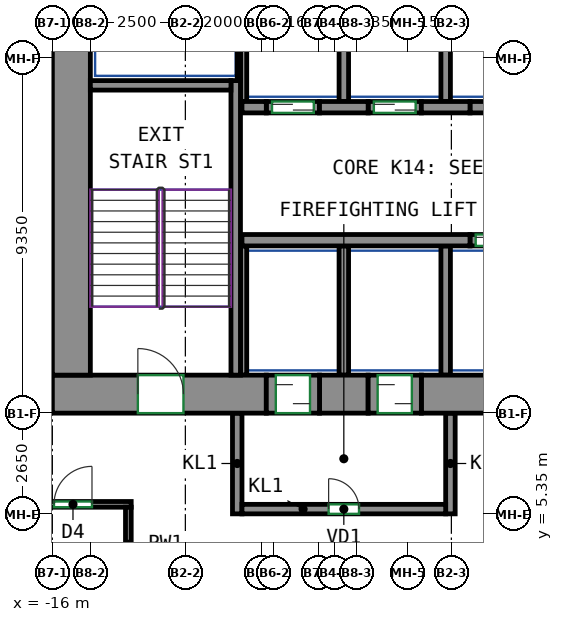
"""IFC4 building model, lengths in metres.
Left out: names, types, materials, properties, quantities, classifications, styles, units other than length and angle.
Written with IfcOpenShell. Run it as: python <this file> out.ifc"""

import sys

from ifc_helpers import new_model, si_unit, direction, frame, frame_2d, origin, place, context, subcontext, project, spatial, rectangle, extrude, source, transform, mapped, element, fill, save


model = new_model("IFC4")
c1 = context("Model", 3, precision=1e-05, world=origin(), true_north=direction((0.0, 1.0)))
c2 = subcontext(c1, "Body", "Model", "MODEL_VIEW")
j1 = project(units=[si_unit("LENGTHUNIT", "METRE"), si_unit("PLANEANGLEUNIT", "RADIAN")], contexts=[c1])
p1 = place(None, origin())
s1 = spatial("IfcSite", under=j1, at=p1, CompositionType="ELEMENT")
p2 = place(p1, origin())
s2 = spatial("IfcBuilding", under=s1, at=p2, CompositionType="ELEMENT")
p3 = place(p2, frame((0.0, 0.0, 59.0)))
s3 = spatial("IfcBuildingStorey", under=s2, at=p3, CompositionType="ELEMENT", Elevation=59.0)
m1 = source(origin(), c2, "Body", "SweptSolid", [
    extrude(rectangle(XDim=5.63, YDim=1.0, at=frame_2d((2.815, 0.0))), origin(), (0.0, 0.0, 1.0), 3.8),
])
p4 = place(p3, frame((-16.0, 8.5, 0.0), z_axis=(0.0, 0.0, 1.0), x_axis=(1.0, 0.0, 0.0)))
e1 = element("IfcWall", 1, at=p4, inside=s3, PredefinedType="SHEAR", context=c2, shape_type="MappedRepresentation", body=[
    mapped(m1, transform((0.0, 0.0, 0.0))),
])
p5 = place(p4, frame((2.25, 0.0, 0.0)))
e2 = element("IfcOpeningElement", 2, at=p5, cuts=e1, PredefinedType="OPENING", context=c2, shape_type="SweptSolid", body=[
    extrude(rectangle(XDim=1.2, YDim=2.1, at=frame_2d((0.6, 1.05))), frame((0.0, 0.51, 0.0), z_axis=(0.0, -1.0, 0.0), x_axis=(1.0, 0.0, 0.0)), (0.0, 0.0, 1.0), 1.02),
])
m2 = source(origin(), c2, "Body", "SweptSolid", [
    extrude(rectangle(XDim=1.28, YDim=1.0, at=frame_2d((0.64, 0.0))), origin(), (0.0, 0.0, 1.0), 3.8),
])
p6 = place(p3, frame((-8.97, 8.5, 0.0), z_axis=(0.0, 0.0, 1.0), x_axis=(1.0, 0.0, 0.0)))
e3 = element("IfcWall", 3, at=p6, inside=s3, PredefinedType="SHEAR", context=c2, shape_type="MappedRepresentation", body=[
    mapped(m2, transform((0.0, 0.0, 0.0))),
])
m3 = source(origin(), c2, "Body", "SweptSolid", [
    extrude(rectangle(XDim=14.18, YDim=1.0, at=frame_2d((7.09, 0.0))), origin(), (0.0, 0.0, 1.0), 3.8),
])
p7 = place(p3, frame((-6.29, 8.5, 0.0), z_axis=(0.0, 0.0, 1.0), x_axis=(1.0, 0.0, 0.0)))
e4 = element("IfcWall", 4, at=p7, inside=s3, PredefinedType="SHEAR", context=c2, shape_type="MappedRepresentation", body=[
    mapped(m3, transform((0.0, 0.0, 0.0))),
])
m4 = source(origin(), c2, "Body", "SweptSolid", [
    extrude(rectangle(XDim=12.0, YDim=1.0, at=frame_2d((6.0, 0.0))), origin(), (0.0, 0.0, 1.0), 3.8),
])
p8 = place(p3, frame((-15.5, 9.0, 0.0), z_axis=(0.0, 0.0, 1.0), x_axis=(0.0, 1.0, 0.0)))
e5 = element("IfcWall", 5, at=p8, inside=s3, PredefinedType="SHEAR", context=c2, shape_type="MappedRepresentation", body=[
    mapped(m4, transform((0.0, 0.0, 0.0))),
])
m5 = source(origin(), c2, "Body", "SweptSolid", [
    extrude(rectangle(XDim=7.75, YDim=0.25, at=frame_2d((3.875, 0.0))), origin(), (0.0, 0.0, 1.0), 3.8),
])
p9 = place(p3, frame((-11.175, 9.0, 0.0), z_axis=(0.0, 0.0, 1.0), x_axis=(0.0, 1.0, 0.0)))
e6 = element("IfcWall", 6, at=p9, inside=s3, PredefinedType="SHEAR", context=c2, shape_type="MappedRepresentation", body=[
    mapped(m5, transform((0.0, 0.0, 0.0))),
])
m6 = source(origin(), c2, "Body", "SweptSolid", [
    extrude(rectangle(XDim=3.7, YDim=0.25, at=frame_2d((1.85, 0.0))), origin(), (0.0, 0.0, 1.0), 3.8),
])
p10 = place(p3, frame((-15.0, 16.625, 0.0), z_axis=(0.0, 0.0, 1.0), x_axis=(1.0, 0.0, 0.0)))
e7 = element("IfcWall", 7, at=p10, inside=s3, PredefinedType="SHEAR", context=c2, shape_type="MappedRepresentation", body=[
    mapped(m6, transform((0.0, 0.0, 0.0))),
])
m7 = source(origin(), c2, "Body", "SweptSolid", [
    extrude(rectangle(XDim=6.0, YDim=0.3, at=frame_2d((3.0, 0.0))), origin(), (0.0, 0.0, 1.0), 3.8),
])
p11 = place(p3, frame((-11.01, 12.55, 0.0), z_axis=(0.0, 0.0, 1.0), x_axis=(1.0, 0.0, 0.0)))
e8 = element("IfcWall", 8, at=p11, inside=s3, PredefinedType="SHEAR", context=c2, shape_type="MappedRepresentation", body=[
    mapped(m7, transform((0.0, 0.0, 0.0))),
])
m8 = source(origin(), c2, "Body", "SweptSolid", [
    extrude(rectangle(XDim=0.64, YDim=0.3, at=frame_2d((0.32, 0.0))), origin(), (0.0, 0.0, 1.0), 3.8),
])
p12 = place(p3, frame((-11.01, 16.05, 0.0), z_axis=(0.0, 0.0, 1.0), x_axis=(1.0, 0.0, 0.0)))
e9 = element("IfcWall", 9, at=p12, inside=s3, PredefinedType="SHEAR", context=c2, shape_type="MappedRepresentation", body=[
    mapped(m8, transform((0.0, 0.0, 0.0))),
])
m9 = source(origin(), c2, "Body", "SweptSolid", [
    extrude(rectangle(XDim=1.28, YDim=0.3, at=frame_2d((0.64, 0.0))), origin(), (0.0, 0.0, 1.0), 3.8),
])
for number, where, z_axis, x_axis in (
    (10, (-8.97, 16.05, 0.0), (0.0, 0.0, 1.0), (1.0, 0.0, 0.0)),
    (11, (-6.29, 16.05, 0.0), (0.0, 0.0, 1.0), (1.0, 0.0, 0.0)),
):
    element("IfcWall", number, at=place(p3, frame(where, z_axis=z_axis, x_axis=x_axis)), inside=s3, PredefinedType="SHEAR", context=c2, shape_type="MappedRepresentation", body=[
        mapped(m9, transform((0.0, 0.0, 0.0))),
    ])
m10 = source(origin(), c2, "Body", "SweptSolid", [
    extrude(rectangle(XDim=1.4, YDim=0.3, at=frame_2d((0.7, 0.0))), origin(), (0.0, 0.0, 1.0), 3.8),
])
p13 = place(p3, frame((-5.01, 12.55, 0.0), z_axis=(0.0, 0.0, 1.0), x_axis=(1.0, 0.0, 0.0)))
e12 = element("IfcWall", 12, at=p13, inside=s3, PredefinedType="PARTITIONING", context=c2, shape_type="MappedRepresentation", body=[
    mapped(m10, transform((0.0, 0.0, 0.0))),
])
p14 = place(p13, frame((0.15, 0.0, 0.0)))
e13 = element("IfcOpeningElement", 13, at=p14, cuts=e12, PredefinedType="OPENING", context=c2, shape_type="SweptSolid", body=[
    extrude(rectangle(XDim=1.1, YDim=2.1, at=frame_2d((0.55, 1.05))), frame((0.0, 0.16, 0.0), z_axis=(0.0, -1.0, 0.0), x_axis=(1.0, 0.0, 0.0)), (0.0, 0.0, 1.0), 0.32),
])
m11 = source(origin(), c2, "Body", "SweptSolid", [
    extrude(rectangle(XDim=1.4, YDim=0.3, at=frame_2d((0.7, 0.0))), origin(), (0.0, 0.0, 1.0), 3.8),
])
p15 = place(p3, frame((-10.37, 16.05, 0.0), z_axis=(0.0, 0.0, 1.0), x_axis=(1.0, 0.0, 0.0)))
e14 = element("IfcWall", 14, at=p15, inside=s3, PredefinedType="PARTITIONING", context=c2, shape_type="MappedRepresentation", body=[
    mapped(m11, transform((0.0, 0.0, 0.0))),
])
p16 = place(p15, frame((0.15, 0.0, 0.0)))
e15 = element("IfcOpeningElement", 15, at=p16, cuts=e14, PredefinedType="OPENING", context=c2, shape_type="SweptSolid", body=[
    extrude(rectangle(XDim=1.1, YDim=2.1, at=frame_2d((0.55, 1.05))), frame((0.0, 0.16, 0.0), z_axis=(0.0, -1.0, 0.0), x_axis=(1.0, 0.0, 0.0)), (0.0, 0.0, 1.0), 0.32),
])
p17 = place(p3, frame((-7.69, 16.05, 0.0), z_axis=(0.0, 0.0, 1.0), x_axis=(1.0, 0.0, 0.0)))
e16 = element("IfcWall", 16, at=p17, inside=s3, PredefinedType="PARTITIONING", context=c2, shape_type="MappedRepresentation", body=[
    mapped(m10, transform((0.0, 0.0, 0.0))),
])
p18 = place(p17, frame((0.15, 0.0, 0.0)))
e17 = element("IfcOpeningElement", 17, at=p18, cuts=e16, PredefinedType="OPENING", context=c2, shape_type="SweptSolid", body=[
    extrude(rectangle(XDim=1.1, YDim=2.1, at=frame_2d((0.55, 1.05))), frame((0.0, 0.16, 0.0), z_axis=(0.0, -1.0, 0.0), x_axis=(1.0, 0.0, 0.0)), (0.0, 0.0, 1.0), 0.32),
])
p19 = place(p3, frame((-5.01, 16.05, 0.0), z_axis=(0.0, 0.0, 1.0), x_axis=(1.0, 0.0, 0.0)))
e18 = element("IfcWall", 18, at=p19, inside=s3, PredefinedType="PARTITIONING", context=c2, shape_type="MappedRepresentation", body=[
    mapped(m10, transform((0.0, 0.0, 0.0))),
])
m12 = source(origin(), c2, "Body", "SweptSolid", [
    extrude(rectangle(XDim=2.65, YDim=0.25, at=frame_2d((1.325, 0.0))), origin(), (0.0, 0.0, 1.0), 3.8),
])
for number, where, z_axis, x_axis in (
    (19, (-11.135, 5.35, 0.0), (0.0, 0.0, 1.0), (0.0, 1.0, 0.0)),
    (20, (-5.525, 5.35, 0.0), (0.0, 0.0, 1.0), (0.0, 1.0, 0.0)),
):
    element("IfcWall", number, at=place(p3, frame(where, z_axis=z_axis, x_axis=x_axis)), inside=s3, PredefinedType="PARTITIONING", context=c2, shape_type="MappedRepresentation", body=[
        mapped(m12, transform((0.0, 0.0, 0.0))),
    ])
m13 = source(origin(), c2, "Body", "SweptSolid", [
    extrude(rectangle(XDim=5.36, YDim=0.25, at=frame_2d((2.68, 0.0))), origin(), (0.0, 0.0, 1.0), 3.8),
])
p20 = place(p3, frame((-11.01, 5.475, 0.0), z_axis=(0.0, 0.0, 1.0), x_axis=(1.0, 0.0, 0.0)))
e21 = element("IfcWall", 21, at=p20, inside=s3, PredefinedType="PARTITIONING", context=c2, shape_type="MappedRepresentation", body=[
    mapped(m13, transform((0.0, 0.0, 0.0))),
])
p21 = place(p20, frame((2.28, 0.0, 0.0)))
e22 = element("IfcOpeningElement", 22, at=p21, cuts=e21, PredefinedType="OPENING", context=c2, shape_type="SweptSolid", body=[
    extrude(rectangle(XDim=0.8, YDim=2.0, at=frame_2d((0.4, 1.0))), frame((0.0, 0.135, 0.0), z_axis=(0.0, -1.0, 0.0), x_axis=(1.0, 0.0, 0.0)), (0.0, 0.0, 1.0), 0.27),
])
m14 = source(origin(), c2, "Body", "SweptSolid", [
    extrude(rectangle(XDim=3.275, YDim=0.165, at=frame_2d((1.638, 0.0))), origin(), (0.0, 0.0, 1.0), 3.8),
])
p22 = place(p3, frame((-10.968, 16.2, 0.0), z_axis=(0.0, 0.0, 1.0), x_axis=(0.0, 1.0, 0.0)))
e23 = element("IfcWall", 23, at=p22, inside=s3, PredefinedType="PARTITIONING", context=c2, shape_type="MappedRepresentation", body=[
    mapped(m14, transform((0.0, 0.0, 0.0))),
])
m15 = source(origin(), c2, "Body", "SweptSolid", [
    extrude(rectangle(XDim=2.725, YDim=0.085, at=frame_2d((1.363, 0.0))), origin(), (0.0, 0.0, 1.0), 3.8),
])
p23 = place(p3, frame((-11.093, 16.75, 0.0), z_axis=(0.0, 0.0, 1.0), x_axis=(0.0, 1.0, 0.0)))
e24 = element("IfcWall", 24, at=p23, inside=s3, PredefinedType="PARTITIONING", context=c2, shape_type="MappedRepresentation", body=[
    mapped(m15, transform((0.0, 0.0, 0.0))),
])
m16 = source(origin(), c2, "Body", "SweptSolid", [
    extrude(rectangle(XDim=3.275, YDim=0.25, at=frame_2d((1.638, 0.0))), origin(), (0.0, 0.0, 1.0), 3.8),
])
for number, where, z_axis, x_axis in (
    (25, (-5.65, 16.2, 0.0), (0.0, 0.0, 1.0), (0.0, 1.0, 0.0)),
    (26, (-8.33, 16.2, 0.0), (0.0, 0.0, 1.0), (0.0, 1.0, 0.0)),
):
    element("IfcWall", number, at=place(p3, frame(where, z_axis=z_axis, x_axis=x_axis)), inside=s3, PredefinedType="PARTITIONING", context=c2, shape_type="MappedRepresentation", body=[
        mapped(m16, transform((0.0, 0.0, 0.0))),
    ])
m17 = source(origin(), c2, "Body", "SweptSolid", [
    extrude(rectangle(XDim=3.4, YDim=0.165, at=frame_2d((1.7, 0.0))), origin(), (0.0, 0.0, 1.0), 3.8),
])
p24 = place(p3, frame((-10.968, 9.0, 0.0), z_axis=(0.0, 0.0, 1.0), x_axis=(0.0, 1.0, 0.0)))
e27 = element("IfcWall", 27, at=p24, inside=s3, PredefinedType="PARTITIONING", context=c2, shape_type="MappedRepresentation", body=[
    mapped(m17, transform((0.0, 0.0, 0.0))),
])
m18 = source(origin(), c2, "Body", "SweptSolid", [
    extrude(rectangle(XDim=3.4, YDim=0.25, at=frame_2d((1.7, 0.0))), origin(), (0.0, 0.0, 1.0), 3.8),
])
for number, where, z_axis, x_axis in (
    (28, (-5.65, 9.0, 0.0), (0.0, 0.0, 1.0), (0.0, 1.0, 0.0)),
    (29, (-8.33, 9.0, 0.0), (0.0, 0.0, 1.0), (0.0, 1.0, 0.0)),
):
    element("IfcWall", number, at=place(p3, frame(where, z_axis=z_axis, x_axis=x_axis)), inside=s3, PredefinedType="PARTITIONING", context=c2, shape_type="MappedRepresentation", body=[
        mapped(m18, transform((0.0, 0.0, 0.0))),
    ])
m19 = source(origin(), c2, "Body", "SweptSolid", [
    extrude(rectangle(XDim=1.4, YDim=1.0, at=frame_2d((0.7, 0.0))), origin(), (0.0, 0.0, 1.0), 2.7),
])
p25 = place(p3, frame((-10.37, 8.5, 0.0), z_axis=(0.0, 0.0, 1.0), x_axis=(1.0, 0.0, 0.0)))
e30 = element("IfcWall", 30, at=p25, inside=s3, PredefinedType="PARTITIONING", context=c2, shape_type="MappedRepresentation", body=[
    mapped(m19, transform((0.0, 0.0, 0.0))),
])
p26 = place(p25, frame((0.25, 0.0, 0.0)))
e31 = element("IfcOpeningElement", 31, at=p26, cuts=e30, PredefinedType="OPENING", context=c2, shape_type="SweptSolid", body=[
    extrude(rectangle(XDim=0.9, YDim=2.1, at=frame_2d((0.45, 1.05))), frame((0.0, 0.51, 0.0), z_axis=(0.0, -1.0, 0.0), x_axis=(1.0, 0.0, 0.0)), (0.0, 0.0, 1.0), 1.02),
])
m20 = source(origin(), c2, "Body", "SweptSolid", [
    extrude(rectangle(XDim=1.4, YDim=1.0, at=frame_2d((0.7, 0.0))), origin(), (0.0, 0.0, 1.0), 2.7),
])
p27 = place(p3, frame((-7.69, 8.5, 0.0), z_axis=(0.0, 0.0, 1.0), x_axis=(1.0, 0.0, 0.0)))
e32 = element("IfcWall", 32, at=p27, inside=s3, PredefinedType="PARTITIONING", context=c2, shape_type="MappedRepresentation", body=[
    mapped(m20, transform((0.0, 0.0, 0.0))),
])
p28 = place(p27, frame((0.25, 0.0, 0.0)))
e33 = element("IfcOpeningElement", 33, at=p28, cuts=e32, PredefinedType="OPENING", context=c2, shape_type="SweptSolid", body=[
    extrude(rectangle(XDim=0.9, YDim=2.1, at=frame_2d((0.45, 1.05))), frame((0.0, 0.51, 0.0), z_axis=(0.0, -1.0, 0.0), x_axis=(1.0, 0.0, 0.0)), (0.0, 0.0, 1.0), 1.02),
])
p29 = place(p3, frame((-19.275, 5.6, 0.0), z_axis=(0.0, 0.0, 1.0), x_axis=(1.0, 0.0, 0.0)))
e34 = element("IfcWall", 34, at=p29, inside=s3, PredefinedType="PARTITIONING", context=c2, shape_type="SweptSolid", body=[
    extrude(rectangle(XDim=5.35, YDim=0.15, at=frame_2d((2.675, 0.0))), origin(), (0.0, 0.0, 1.0), 3.8),
])
p30 = place(p29, frame((3.318, 0.0, 0.0)))
e35 = element("IfcOpeningElement", 35, at=p30, cuts=e34, PredefinedType="OPENING", context=c2, shape_type="SweptSolid", body=[
    extrude(rectangle(XDim=1.0, YDim=2.1, at=frame_2d((0.5, 1.05))), frame((0.0, 0.085, 0.0), z_axis=(0.0, -1.0, 0.0), x_axis=(1.0, 0.0, 0.0)), (0.0, 0.0, 1.0), 0.17),
])
p31 = place(p3, frame((-14.0, 5.525, 0.0), z_axis=(0.0, 0.0, 1.0), x_axis=(0.0, -1.0, 0.0)))
e36 = element("IfcWall", 36, at=p31, inside=s3, PredefinedType="PARTITIONING", context=c2, shape_type="SweptSolid", body=[
    extrude(rectangle(XDim=1.95, YDim=0.15, at=frame_2d((0.975, 0.0))), origin(), (0.0, 0.0, 1.0), 3.8),
])
p32 = place(p21, origin())
e37 = element("IfcDoor", 37, at=p32, inside=s3, OperationType="SINGLE_SWING_LEFT", PredefinedType="DOOR", context=c2, shape_type="SweptSolid", body=[
    extrude(rectangle(XDim=0.8, YDim=2.0, at=frame_2d((0.4, 1.0))), frame((0.0, 0.025, 0.0), z_axis=(0.0, -1.0, 0.0), x_axis=(1.0, 0.0, 0.0)), (0.0, 0.0, 1.0), 0.05),
])
fill(e22, e37)
p33 = place(p26, origin())
e38 = element("IfcDoor", 38, at=p33, inside=s3, OperationType="SLIDING_TO_LEFT", PredefinedType="DOOR", context=c2, shape_type="SweptSolid", body=[
    extrude(rectangle(XDim=0.9, YDim=2.1, at=frame_2d((0.45, 1.05))), frame((0.0, 0.405, 0.0), z_axis=(0.0, -1.0, 0.0), x_axis=(1.0, 0.0, 0.0)), (0.0, 0.0, 1.0), 0.05),
])
fill(e31, e38)
p34 = place(p28, origin())
e39 = element("IfcDoor", 39, at=p34, inside=s3, OperationType="SLIDING_TO_RIGHT", PredefinedType="DOOR", context=c2, shape_type="SweptSolid", body=[
    extrude(rectangle(XDim=0.9, YDim=2.1, at=frame_2d((0.45, 1.05))), frame((0.0, 0.405, 0.0), z_axis=(0.0, -1.0, 0.0), x_axis=(1.0, 0.0, 0.0)), (0.0, 0.0, 1.0), 0.05),
])
fill(e33, e39)
p35 = place(p14, origin())
e40 = element("IfcDoor", 40, at=p35, inside=s3, OperationType="DOUBLE_DOOR_SLIDING", PredefinedType="DOOR", context=c2, shape_type="SweptSolid", body=[
    extrude(rectangle(XDim=1.1, YDim=2.1, at=frame_2d((0.55, 1.05))), frame((0.0, 0.025, 0.0), z_axis=(0.0, -1.0, 0.0), x_axis=(1.0, 0.0, 0.0)), (0.0, 0.0, 1.0), 0.05),
])
fill(e13, e40)
p36 = place(p16, origin())
e41 = element("IfcDoor", 41, at=p36, inside=s3, OperationType="DOUBLE_DOOR_SLIDING", PredefinedType="DOOR", context=c2, shape_type="SweptSolid", body=[
    extrude(rectangle(XDim=1.1, YDim=2.1, at=frame_2d((0.55, 1.05))), frame((0.0, 0.025, 0.0), z_axis=(0.0, -1.0, 0.0), x_axis=(1.0, 0.0, 0.0)), (0.0, 0.0, 1.0), 0.05),
])
fill(e15, e41)
p37 = place(p18, origin())
e42 = element("IfcDoor", 42, at=p37, inside=s3, OperationType="DOUBLE_DOOR_SLIDING", PredefinedType="DOOR", context=c2, shape_type="SweptSolid", body=[
    extrude(rectangle(XDim=1.1, YDim=2.1, at=frame_2d((0.55, 1.05))), frame((0.0, 0.025, 0.0), z_axis=(0.0, -1.0, 0.0), x_axis=(1.0, 0.0, 0.0)), (0.0, 0.0, 1.0), 0.05),
])
fill(e17, e42)
p38 = place(p5, origin())
e43 = element("IfcDoor", 43, at=p38, inside=s3, OperationType="DOUBLE_DOOR_SINGLE_SWING", PredefinedType="DOOR", context=c2, shape_type="SweptSolid", body=[
    extrude(rectangle(XDim=1.2, YDim=2.1, at=frame_2d((0.6, 1.05))), frame((0.0, 0.405, 0.0), z_axis=(0.0, -1.0, 0.0), x_axis=(1.0, 0.0, 0.0)), (0.0, 0.0, 1.0), 0.05),
])
fill(e2, e43)
p39 = place(p30, origin())
e44 = element("IfcDoor", 44, at=p39, inside=s3, OperationType="SINGLE_SWING_RIGHT", PredefinedType="DOOR", context=c2, shape_type="SweptSolid", body=[
    extrude(rectangle(XDim=1.0, YDim=2.1, at=frame_2d((0.5, 1.05))), frame((0.0, 0.025, 0.0), z_axis=(0.0, -1.0, 0.0), x_axis=(1.0, 0.0, 0.0)), (0.0, 0.0, 1.0), 0.05),
])
fill(e35, e44)
save(model, sys.argv[1])
